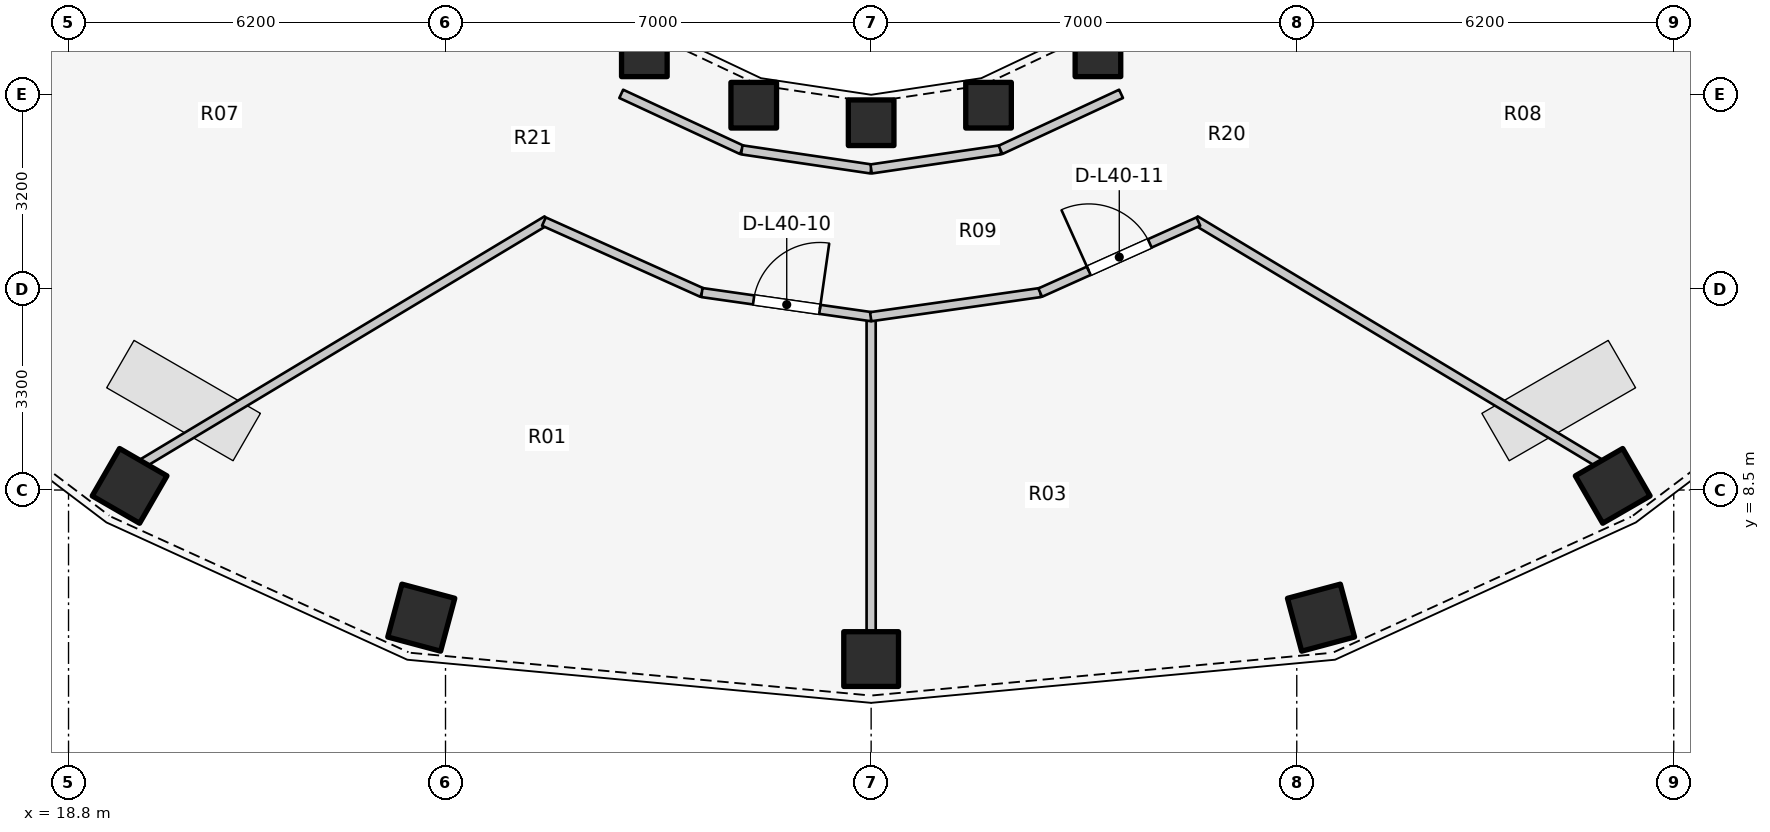
"""IFC4 building model, lengths in metres.
Left out: names, types, materials, properties, quantities, classifications, styles, units other than length and angle.
Written with IfcOpenShell. Run it as: python <this file> out.ifc"""

import sys

from ifc_helpers import new_model, si_unit, direction, frame, frame_2d, origin, origin_2d, place, context, subcontext, project, spatial, rectangle, extrude, element, fill, save


model = new_model("IFC4")
c1 = context("Model", 3, precision=1e-05, world=origin(), true_north=direction((0.0, 1.0)))
c2 = subcontext(c1, "Body", "Model", "MODEL_VIEW")
j1 = project(units=[si_unit("LENGTHUNIT", "METRE"), si_unit("PLANEANGLEUNIT", "RADIAN")], contexts=[c1])
p1 = place(None, origin())
s1 = spatial("IfcSite", under=j1, at=p1, CompositionType="ELEMENT")
p2 = place(p1, origin())
s2 = spatial("IfcBuilding", under=s1, at=p2, CompositionType="ELEMENT")
p3 = place(p2, frame((0.0, 0.0, 133.2)))
s3 = spatial("IfcBuildingStorey", under=s2, at=p3, CompositionType="ELEMENT", Elevation=133.2)
p4 = place(p3, frame((28.27, 15.673, 0.0), z_axis=(0.0, 0.0, 1.0), x_axis=(1.0, 0.0, 0.0)))
e1 = element("IfcColumn", 1, at=p4, inside=s3, PredefinedType="COLUMN", context=c2, shape_type="SweptSolid", body=[
    extrude(rectangle(XDim=0.75, YDim=0.75, at=origin_2d()), origin(), (0.0, 0.0, 1.0), 4.2),
])
p5 = place(p3, frame((19.804, 8.568, 0.0), z_axis=(0.0, 0.0, 1.0), x_axis=(-0.5, -0.866025403784, 0.0)))
e2 = element("IfcColumn", 2, at=p5, inside=s3, PredefinedType="COLUMN", context=c2, shape_type="SweptSolid", body=[
    extrude(rectangle(XDim=0.9, YDim=0.9, at=origin_2d()), origin(), (0.0, 0.0, 1.0), 4.2),
])
p6 = place(p3, frame((30.069, 14.828, 0.0), z_axis=(0.0, 0.0, 1.0), x_axis=(1.0, 0.0, 0.0)))
e3 = element("IfcColumn", 3, at=p6, inside=s3, PredefinedType="COLUMN", context=c2, shape_type="SweptSolid", body=[
    extrude(rectangle(XDim=0.75, YDim=0.75, at=origin_2d()), origin(), (0.0, 0.0, 1.0), 4.2),
])
p7 = place(p3, frame((24.601, 6.401, 0.0), z_axis=(0.0, 0.0, 1.0), x_axis=(-0.258819045103, -0.965925826289, 0.0)))
e4 = element("IfcColumn", 4, at=p7, inside=s3, PredefinedType="COLUMN", context=c2, shape_type="SweptSolid", body=[
    extrude(rectangle(XDim=0.9, YDim=0.9, at=origin_2d()), origin(), (0.0, 0.0, 1.0), 4.2),
])
p8 = place(p3, frame((32.0, 14.54, 0.0), z_axis=(0.0, 0.0, 1.0), x_axis=(1.0, 0.0, 0.0)))
e5 = element("IfcColumn", 5, at=p8, inside=s3, PredefinedType="COLUMN", context=c2, shape_type="SweptSolid", body=[
    extrude(rectangle(XDim=0.75, YDim=0.75, at=origin_2d()), origin(), (0.0, 0.0, 1.0), 4.2),
])
p9 = place(p3, frame((32.0, 5.72, 0.0), z_axis=(0.0, 0.0, 1.0), x_axis=(0.0, -1.0, 0.0)))
e6 = element("IfcColumn", 6, at=p9, inside=s3, PredefinedType="COLUMN", context=c2, shape_type="SweptSolid", body=[
    extrude(rectangle(XDim=0.9, YDim=0.9, at=origin_2d()), origin(), (0.0, 0.0, 1.0), 4.2),
])
p10 = place(p3, frame((33.931, 14.828, 0.0), z_axis=(0.0, 0.0, 1.0), x_axis=(1.0, 0.0, 0.0)))
e7 = element("IfcColumn", 7, at=p10, inside=s3, PredefinedType="COLUMN", context=c2, shape_type="SweptSolid", body=[
    extrude(rectangle(XDim=0.75, YDim=0.75, at=origin_2d()), origin(), (0.0, 0.0, 1.0), 4.2),
])
p11 = place(p3, frame((39.399, 6.401, 0.0), z_axis=(0.0, 0.0, 1.0), x_axis=(0.258819045103, -0.965925826289, 0.0)))
e8 = element("IfcColumn", 8, at=p11, inside=s3, PredefinedType="COLUMN", context=c2, shape_type="SweptSolid", body=[
    extrude(rectangle(XDim=0.9, YDim=0.9, at=origin_2d()), origin(), (0.0, 0.0, 1.0), 4.2),
])
p12 = place(p3, frame((35.73, 15.673, 0.0), z_axis=(0.0, 0.0, 1.0), x_axis=(1.0, 0.0, 0.0)))
e9 = element("IfcColumn", 9, at=p12, inside=s3, PredefinedType="COLUMN", context=c2, shape_type="SweptSolid", body=[
    extrude(rectangle(XDim=0.75, YDim=0.75, at=origin_2d()), origin(), (0.0, 0.0, 1.0), 4.2),
])
p13 = place(p3, frame((44.196, 8.568, 0.0), z_axis=(0.0, 0.0, 1.0), x_axis=(0.5, -0.866025403784, 0.0)))
e10 = element("IfcColumn", 10, at=p13, inside=s3, PredefinedType="COLUMN", context=c2, shape_type="SweptSolid", body=[
    extrude(rectangle(XDim=0.9, YDim=0.9, at=origin_2d()), origin(), (0.0, 0.0, 1.0), 4.2),
])
p14 = place(p3, frame((27.89, 15.015, 0.0), z_axis=(0.0, 0.0, 1.0), x_axis=(0.906943449489, -0.421252393975, 0.0)))
e11 = element("IfcWall", 11, at=p14, inside=s3, PredefinedType="PARTITIONING", context=c2, shape_type="SweptSolid", body=[
    extrude(rectangle(XDim=2.186, YDim=0.15, at=frame_2d((1.093, 0.0))), origin(), (0.0, 0.0, 1.0), 2.32),
])
for number, where, z_axis, x_axis in (
    (12, (29.873, 14.094, 0.0), (0.0, 0.0, 1.0), (0.989, -0.146, 0.0)),
    (13, (32.0, 13.78, 0.0), (0.0, 0.0, 1.0), (0.989, 0.146, 0.0)),
):
    element("IfcWall", number, at=place(p3, frame(where, z_axis=z_axis, x_axis=x_axis)), inside=s3, PredefinedType="PARTITIONING", context=c2, shape_type="SweptSolid", body=[
        extrude(rectangle(XDim=2.151, YDim=0.15, at=frame_2d((1.075, 0.0))), origin(), (0.0, 0.0, 1.0), 2.32),
    ])
p15 = place(p3, frame((34.127, 14.094, 0.0), z_axis=(0.0, 0.0, 1.0), x_axis=(0.906943449489, 0.421252393975, 0.0)))
e14 = element("IfcWall", 14, at=p15, inside=s3, PredefinedType="PARTITIONING", context=c2, shape_type="SweptSolid", body=[
    extrude(rectangle(XDim=2.186, YDim=0.15, at=frame_2d((1.093, 0.0))), origin(), (0.0, 0.0, 1.0), 2.32),
])
p16 = place(p3, frame((26.668, 12.937, 0.0), z_axis=(0.0, 0.0, 1.0), x_axis=(-0.857109469509, -0.515134309941, 0.0)))
e15 = element("IfcWall", 15, at=p16, inside=s3, PredefinedType="PARTITIONING", context=c2, shape_type="SweptSolid", body=[
    extrude(rectangle(XDim=7.757, YDim=0.15, at=frame_2d((3.879, 0.0))), origin(), (0.0, 0.0, 1.0), 2.32),
])
p17 = place(p3, frame((32.0, 11.4, 0.0), z_axis=(0.0, 0.0, 1.0), x_axis=(0.0, -1.0, 0.0)))
e16 = element("IfcWall", 16, at=p17, inside=s3, PredefinedType="PARTITIONING", context=c2, shape_type="SweptSolid", body=[
    extrude(rectangle(XDim=5.25, YDim=0.15, at=frame_2d((2.625, 0.0))), origin(), (0.0, 0.0, 1.0), 2.32),
])
p18 = place(p3, frame((26.618, 12.915, 0.0), z_axis=(0.0, 0.0, 1.0), x_axis=(0.9121872495, -0.409773622687, 0.0)))
e17 = element("IfcWall", 17, at=p18, inside=s3, PredefinedType="PARTITIONING", context=c2, shape_type="SweptSolid", body=[
    extrude(rectangle(XDim=2.852, YDim=0.15, at=frame_2d((1.426, 0.0))), origin(), (0.0, 0.0, 1.0), 2.32),
])
p19 = place(p3, frame((29.216, 11.748, 0.0), z_axis=(0.0, 0.0, 1.0), x_axis=(0.990016911465, -0.140948625436, 0.0)))
e18 = element("IfcWall", 18, at=p19, inside=s3, PredefinedType="PARTITIONING", context=c2, shape_type="SweptSolid", body=[
    extrude(rectangle(XDim=2.82, YDim=0.15, at=frame_2d((1.41, 0.0))), origin(), (0.0, 0.0, 1.0), 2.32),
])
p20 = place(p19, frame((0.86, 0.0, 0.0)))
e19 = element("IfcOpeningElement", 19, at=p20, cuts=e18, PredefinedType="OPENING", context=c2, shape_type="SweptSolid", body=[
    extrude(rectangle(XDim=1.1, YDim=2.1, at=frame_2d((0.55, 1.05))), frame((0.0, 0.085, 0.0), z_axis=(0.0, -1.0, 0.0), x_axis=(1.0, 0.0, 0.0)), (0.0, 0.0, 1.0), 0.17),
])
p21 = place(p3, frame((37.332, 12.937, 0.0), z_axis=(0.0, 0.0, 1.0), x_axis=(0.857109469509, -0.515134309941, 0.0)))
e20 = element("IfcWall", 20, at=p21, inside=s3, PredefinedType="PARTITIONING", context=c2, shape_type="SweptSolid", body=[
    extrude(rectangle(XDim=7.757, YDim=0.15, at=frame_2d((3.879, 0.0))), origin(), (0.0, 0.0, 1.0), 2.32),
])
p22 = place(p3, frame((31.992, 11.35, 0.0), z_axis=(0.0, 0.0, 1.0), x_axis=(0.990016911465, 0.140948625436, 0.0)))
e21 = element("IfcWall", 21, at=p22, inside=s3, PredefinedType="PARTITIONING", context=c2, shape_type="SweptSolid", body=[
    extrude(rectangle(XDim=2.82, YDim=0.15, at=frame_2d((1.41, 0.0))), origin(), (0.0, 0.0, 1.0), 2.32),
])
p23 = place(p3, frame((34.781, 11.746, 0.0), z_axis=(0.0, 0.0, 1.0), x_axis=(0.9121872495, 0.409773622687, 0.0)))
e22 = element("IfcWall", 22, at=p23, inside=s3, PredefinedType="PARTITIONING", context=c2, shape_type="SweptSolid", body=[
    extrude(rectangle(XDim=2.852, YDim=0.15, at=frame_2d((1.426, 0.0))), origin(), (0.0, 0.0, 1.0), 2.32),
])
p24 = place(p23, frame((0.876, 0.0, 0.0)))
e23 = element("IfcOpeningElement", 23, at=p24, cuts=e22, PredefinedType="OPENING", context=c2, shape_type="SweptSolid", body=[
    extrude(rectangle(XDim=1.1, YDim=2.1, at=frame_2d((0.55, 1.05))), frame((0.0, 0.085, 0.0), z_axis=(0.0, -1.0, 0.0), x_axis=(1.0, 0.0, 0.0)), (0.0, 0.0, 1.0), 0.17),
])
p25 = place(p20, origin())
e24 = element("IfcDoor", 24, at=p25, inside=s3, OperationType="SINGLE_SWING_RIGHT", PredefinedType="DOOR", context=c2, shape_type="SweptSolid", body=[
    extrude(rectangle(XDim=1.1, YDim=2.1, at=frame_2d((0.55, 1.05))), frame((0.0, 0.025, 0.0), z_axis=(0.0, -1.0, 0.0), x_axis=(1.0, 0.0, 0.0)), (0.0, 0.0, 1.0), 0.05),
])
fill(e19, e24)
p26 = place(p24, origin())
e25 = element("IfcDoor", 25, at=p26, inside=s3, OperationType="SINGLE_SWING_LEFT", PredefinedType="DOOR", context=c2, shape_type="SweptSolid", body=[
    extrude(rectangle(XDim=1.1, YDim=2.1, at=frame_2d((0.55, 1.05))), frame((0.0, 0.025, 0.0), z_axis=(0.0, -1.0, 0.0), x_axis=(1.0, 0.0, 0.0)), (0.0, 0.0, 1.0), 0.05),
])
fill(e23, e25)
save(model, sys.argv[1])
